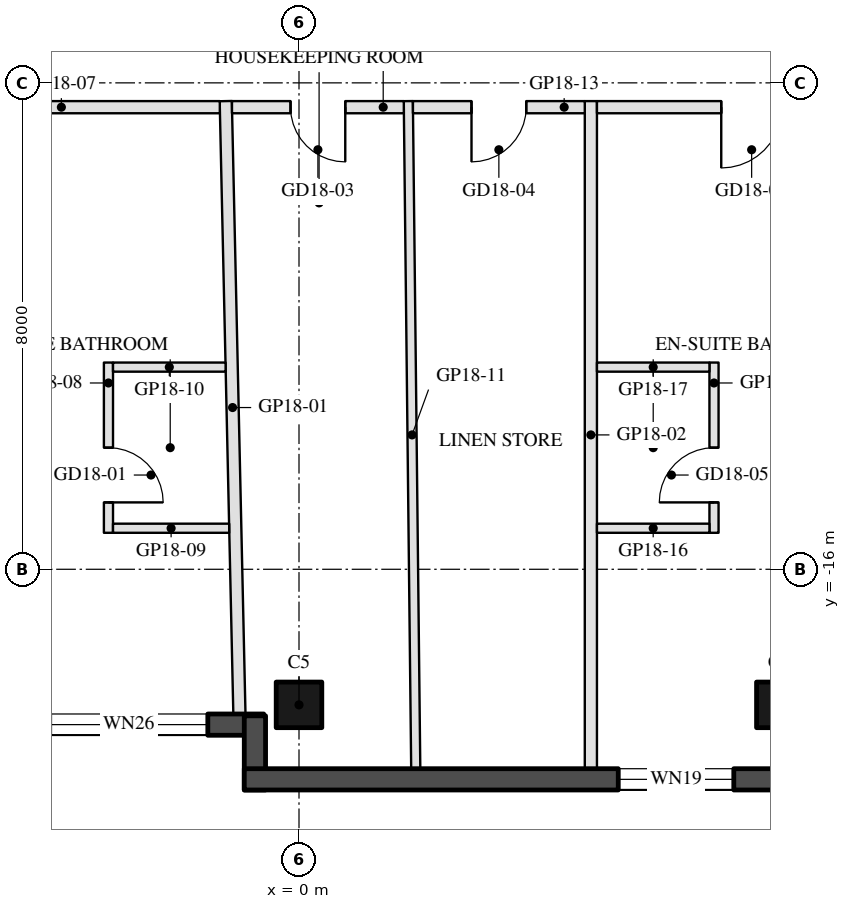
"""IFC4 building model, lengths in metres.
Left out: names, types, materials, properties, quantities, classifications, styles, units other than length and angle.
Written with IfcOpenShell. Run it as: python <this file> out.ifc"""

import sys

from ifc_helpers import new_model, si_unit, direction, frame, frame_2d, origin, origin_2d, place, context, subcontext, project, spatial, rectangle, hollow_rectangle, extrude, element, fill, save


model = new_model("IFC4")
c1 = context("Model", 3, precision=1e-05, world=origin(), true_north=direction((0.0, 1.0)))
c2 = subcontext(c1, "Body", "Model", "MODEL_VIEW")
j1 = project(units=[si_unit("LENGTHUNIT", "METRE"), si_unit("PLANEANGLEUNIT", "RADIAN")], contexts=[c1])
p1 = place(None, origin())
s1 = spatial("IfcSite", under=j1, at=p1, CompositionType="ELEMENT")
p2 = place(p1, origin())
s2 = spatial("IfcBuilding", under=s1, at=p2, CompositionType="ELEMENT")
p3 = place(p2, frame((0.0, 0.0, 194.7)))
s3 = spatial("IfcBuildingStorey", under=s2, at=p3, CompositionType="ELEMENT", Elevation=194.7)
for number, where, z_axis, x_axis in (
    (1, (0.0, -18.23, 0.0), (0.0, 0.0, 1.0), (-1.0, 0.0, 0.0)),
    (2, (7.9, -18.23, 0.0), (0.0, 0.0, 1.0), (-1.0, 0.0, 0.0)),
):
    element("IfcColumn", number, at=place(p3, frame(where, z_axis=z_axis, x_axis=x_axis)), inside=s3, PredefinedType="COLUMN", context=c2, shape_type="SweptSolid", body=[
        extrude(hollow_rectangle(XDim=0.75, YDim=0.75, WallThickness=0.035, at=origin_2d()), origin(), (0.0, 0.0, 1.0), 3.7),
    ])
p4 = place(p3, frame((-7.32, -18.555, 0.0), z_axis=(0.0, 0.0, 1.0), x_axis=(1.0, 0.0, 0.0)))
e3 = element("IfcWall", 3, at=p4, inside=s3, PredefinedType="SOLIDWALL", context=c2, shape_type="SweptSolid", body=[
    extrude(rectangle(XDim=6.74, YDim=0.35, at=frame_2d((3.37, 0.0))), origin(), (0.0, 0.0, 1.0), 3.55),
])
p5 = place(p4, frame((0.32, 0.0, 0.3)))
e4 = element("IfcOpeningElement", 4, at=p5, cuts=e3, PredefinedType="OPENING", context=c2, shape_type="SweptSolid", body=[
    extrude(rectangle(XDim=2.6, YDim=2.65, at=frame_2d((1.3, 1.325))), frame((0.0, 0.185, 0.0), z_axis=(0.0, -1.0, 0.0), x_axis=(1.0, 0.0, 0.0)), (0.0, 0.0, 1.0), 0.37),
])
p6 = place(p4, frame((3.22, 0.0, 0.3)))
e5 = element("IfcOpeningElement", 5, at=p6, cuts=e3, PredefinedType="OPENING", context=c2, shape_type="SweptSolid", body=[
    extrude(rectangle(XDim=2.6, YDim=2.65, at=frame_2d((1.3, 1.325))), frame((0.0, 0.185, 0.0), z_axis=(0.0, -1.0, 0.0), x_axis=(1.0, 0.0, 0.0)), (0.0, 0.0, 1.0), 0.37),
])
p7 = place(p3, frame((-0.725, -18.41, 0.0), z_axis=(0.0, 0.0, 1.0), x_axis=(0.0, -1.0, 0.0)))
e6 = element("IfcWall", 6, at=p7, inside=s3, PredefinedType="SOLIDWALL", context=c2, shape_type="SweptSolid", body=[
    extrude(rectangle(XDim=1.22, YDim=0.35, at=frame_2d((0.61, 0.0))), origin(), (0.0, 0.0, 1.0), 3.55),
])
p8 = place(p3, frame((-0.9, -19.455, 0.0), z_axis=(0.0, 0.0, 1.0), x_axis=(1.0, 0.0, 0.0)))
e7 = element("IfcWall", 7, at=p8, inside=s3, PredefinedType="SOLIDWALL", context=c2, shape_type="SweptSolid", body=[
    extrude(rectangle(XDim=9.7, YDim=0.35, at=frame_2d((4.85, 0.0))), origin(), (0.0, 0.0, 1.0), 3.55),
])
p9 = place(p8, frame((6.15, 0.0, 0.3)))
e8 = element("IfcOpeningElement", 8, at=p9, cuts=e7, PredefinedType="OPENING", context=c2, shape_type="SweptSolid", body=[
    extrude(rectangle(XDim=1.9, YDim=2.65, at=frame_2d((0.95, 1.325))), frame((0.0, 0.185, 0.0), z_axis=(0.0, -1.0, 0.0), x_axis=(1.0, 0.0, 0.0)), (0.0, 0.0, 1.0), 0.37),
])
p10 = place(p3, frame((-0.98, -18.38, 0.0), z_axis=(0.0, 0.0, 1.0), x_axis=(-0.022277513004, 0.999751825412, 0.0)))
e9 = element("IfcWall", 9, at=p10, inside=s3, PredefinedType="PARTITIONING", context=c2, shape_type="SweptSolid", body=[
    extrude(rectangle(XDim=10.082, YDim=0.2, at=frame_2d((5.041, 0.0))), origin(), (0.0, 0.0, 1.0), 3.06),
])
p11 = place(p3, frame((4.8, -19.28, 0.0), z_axis=(0.0, 0.0, 1.0), x_axis=(0.0, 1.0, 0.0)))
e10 = element("IfcWall", 10, at=p11, inside=s3, PredefinedType="PARTITIONING", context=c2, shape_type="SweptSolid", body=[
    extrude(rectangle(XDim=10.98, YDim=0.2, at=frame_2d((5.49, 0.0))), origin(), (0.0, 0.0, 1.0), 3.06),
])
p12 = place(p3, frame((-1.302, -8.4, 0.0), z_axis=(0.0, 0.0, 1.0), x_axis=(-1.0, 0.0, 0.0)))
e11 = element("IfcWall", 11, at=p12, inside=s3, PredefinedType="PARTITIONING", context=c2, shape_type="SweptSolid", body=[
    extrude(rectangle(XDim=8.686, YDim=0.2, at=frame_2d((4.343, 0.0))), origin(), (0.0, 0.0, 1.0), 2.95),
])
p13 = place(p12, frame((3.843, 0.0, 0.0)))
e12 = element("IfcOpeningElement", 12, at=p13, cuts=e11, PredefinedType="OPENING", context=c2, shape_type="SweptSolid", body=[
    extrude(rectangle(XDim=1.0, YDim=2.1, at=frame_2d((0.5, 1.05))), frame((0.0, 0.11, 0.0), z_axis=(0.0, -1.0, 0.0), x_axis=(1.0, 0.0, 0.0)), (0.0, 0.0, 1.0), 0.22),
])
p14 = place(p3, frame((-3.134, -12.6, 0.0), z_axis=(0.0, 0.0, 1.0), x_axis=(0.0, -1.0, 0.0)))
e13 = element("IfcWall", 13, at=p14, inside=s3, PredefinedType="PARTITIONING", context=c2, shape_type="SweptSolid", body=[
    extrude(rectangle(XDim=2.8, YDim=0.15, at=frame_2d((1.4, 0.0))), origin(), (0.0, 0.0, 1.0), 3.55),
])
p15 = place(p14, frame((1.4, 0.0, 0.0)))
e14 = element("IfcOpeningElement", 14, at=p15, cuts=e13, PredefinedType="OPENING", context=c2, shape_type="SweptSolid", body=[
    extrude(rectangle(XDim=0.9, YDim=2.1, at=frame_2d((0.45, 1.05))), frame((0.0, 0.085, 0.0), z_axis=(0.0, -1.0, 0.0), x_axis=(1.0, 0.0, 0.0)), (0.0, 0.0, 1.0), 0.17),
])
p16 = place(p3, frame((-3.059, -15.325, 0.0), z_axis=(0.0, 0.0, 1.0), x_axis=(1.0, 0.0, 0.0)))
e15 = element("IfcWall", 15, at=p16, inside=s3, PredefinedType="PARTITIONING", context=c2, shape_type="SweptSolid", body=[
    extrude(rectangle(XDim=1.91, YDim=0.15, at=frame_2d((0.955, 0.0))), origin(), (0.0, 0.0, 1.0), 3.55),
])
p17 = place(p3, frame((-3.059, -12.675, 0.0), z_axis=(0.0, 0.0, 1.0), x_axis=(1.0, 0.0, 0.0)))
e16 = element("IfcWall", 16, at=p17, inside=s3, PredefinedType="PARTITIONING", context=c2, shape_type="SweptSolid", body=[
    extrude(rectangle(XDim=1.852, YDim=0.15, at=frame_2d((0.926, 0.0))), origin(), (0.0, 0.0, 1.0), 3.55),
])
p18 = place(p3, frame((1.92, -19.28, 0.0), z_axis=(0.0, 0.0, 1.0), x_axis=(-0.011116847578, 0.999938205941, 0.0)))
e17 = element("IfcWall", 17, at=p18, inside=s3, PredefinedType="PARTITIONING", context=c2, shape_type="SweptSolid", body=[
    extrude(rectangle(XDim=10.981, YDim=0.15, at=frame_2d((5.49, 0.0))), origin(), (0.0, 0.0, 1.0), 3.06),
])
p19 = place(p3, frame((1.724, -8.4, 0.0), z_axis=(0.0, 0.0, 1.0), x_axis=(-1.0, 0.0, 0.0)))
e18 = element("IfcWall", 18, at=p19, inside=s3, PredefinedType="PARTITIONING", context=c2, shape_type="SweptSolid", body=[
    extrude(rectangle(XDim=2.826, YDim=0.2, at=frame_2d((1.413, 0.0))), origin(), (0.0, 0.0, 1.0), 2.95),
])
p20 = place(p19, frame((0.963, 0.0, 0.0)))
e19 = element("IfcOpeningElement", 19, at=p20, cuts=e18, PredefinedType="OPENING", context=c2, shape_type="SweptSolid", body=[
    extrude(rectangle(XDim=0.9, YDim=2.1, at=frame_2d((0.45, 1.05))), frame((0.0, 0.11, 0.0), z_axis=(0.0, -1.0, 0.0), x_axis=(1.0, 0.0, 0.0)), (0.0, 0.0, 1.0), 0.22),
])
p21 = place(p3, frame((4.7, -8.4, 0.0), z_axis=(0.0, 0.0, 1.0), x_axis=(-1.0, 0.0, 0.0)))
e20 = element("IfcWall", 20, at=p21, inside=s3, PredefinedType="PARTITIONING", context=c2, shape_type="SweptSolid", body=[
    extrude(rectangle(XDim=2.826, YDim=0.2, at=frame_2d((1.413, 0.0))), origin(), (0.0, 0.0, 1.0), 2.95),
])
p22 = place(p21, frame((0.963, 0.0, 0.0)))
e21 = element("IfcOpeningElement", 21, at=p22, cuts=e20, PredefinedType="OPENING", context=c2, shape_type="SweptSolid", body=[
    extrude(rectangle(XDim=0.9, YDim=2.1, at=frame_2d((0.45, 1.05))), frame((0.0, 0.11, 0.0), z_axis=(0.0, -1.0, 0.0), x_axis=(1.0, 0.0, 0.0)), (0.0, 0.0, 1.0), 0.22),
])
p23 = place(p3, frame((9.988, -8.4, 0.0), z_axis=(0.0, 0.0, 1.0), x_axis=(-1.0, 0.0, 0.0)))
e22 = element("IfcWall", 22, at=p23, inside=s3, PredefinedType="PARTITIONING", context=c2, shape_type="SweptSolid", body=[
    extrude(rectangle(XDim=5.088, YDim=0.2, at=frame_2d((2.544, 0.0))), origin(), (0.0, 0.0, 1.0), 2.95),
])
p24 = place(p23, frame((2.044, 0.0, 0.0)))
e23 = element("IfcOpeningElement", 23, at=p24, cuts=e22, PredefinedType="OPENING", context=c2, shape_type="SweptSolid", body=[
    extrude(rectangle(XDim=1.0, YDim=2.1, at=frame_2d((0.5, 1.05))), frame((0.0, 0.11, 0.0), z_axis=(0.0, -1.0, 0.0), x_axis=(1.0, 0.0, 0.0)), (0.0, 0.0, 1.0), 0.22),
])
p25 = place(p3, frame((6.825, -15.4, 0.0), z_axis=(0.0, 0.0, 1.0), x_axis=(0.0, 1.0, 0.0)))
e24 = element("IfcWall", 24, at=p25, inside=s3, PredefinedType="PARTITIONING", context=c2, shape_type="SweptSolid", body=[
    extrude(rectangle(XDim=2.8, YDim=0.15, at=frame_2d((1.4, 0.0))), origin(), (0.0, 0.0, 1.0), 3.55),
])
p26 = place(p25, frame((0.5, 0.0, 0.0)))
e25 = element("IfcOpeningElement", 25, at=p26, cuts=e24, PredefinedType="OPENING", context=c2, shape_type="SweptSolid", body=[
    extrude(rectangle(XDim=0.9, YDim=2.1, at=frame_2d((0.45, 1.05))), frame((0.0, 0.085, 0.0), z_axis=(0.0, -1.0, 0.0), x_axis=(1.0, 0.0, 0.0)), (0.0, 0.0, 1.0), 0.17),
])
for number, where, z_axis, x_axis in (
    (26, (4.9, -15.325, 0.0), (0.0, 0.0, 1.0), (1.0, 0.0, 0.0)),
    (27, (4.9, -12.675, 0.0), (0.0, 0.0, 1.0), (1.0, 0.0, 0.0)),
):
    element("IfcWall", number, at=place(p3, frame(where, z_axis=z_axis, x_axis=x_axis)), inside=s3, PredefinedType="PARTITIONING", context=c2, shape_type="SweptSolid", body=[
        extrude(rectangle(XDim=1.85, YDim=0.15, at=frame_2d((0.925, 0.0))), origin(), (0.0, 0.0, 1.0), 3.55),
    ])
p27 = place(p6, origin())
e28 = element("IfcWindow", 28, at=p27, inside=s3, PartitioningType="SINGLE_PANEL", PredefinedType="WINDOW", context=c2, shape_type="SweptSolid", body=[
    extrude(rectangle(XDim=2.6, YDim=2.65, at=frame_2d((1.3, 1.325))), frame((0.0, 0.03, 0.0), z_axis=(0.0, -1.0, 0.0), x_axis=(1.0, 0.0, 0.0)), (0.0, 0.0, 1.0), 0.06),
])
fill(e5, e28)
p28 = place(p9, origin())
e29 = element("IfcWindow", 29, at=p28, inside=s3, PartitioningType="SINGLE_PANEL", PredefinedType="WINDOW", context=c2, shape_type="SweptSolid", body=[
    extrude(rectangle(XDim=1.9, YDim=2.65, at=frame_2d((0.95, 1.325))), frame((0.0, 0.03, 0.0), z_axis=(0.0, -1.0, 0.0), x_axis=(1.0, 0.0, 0.0)), (0.0, 0.0, 1.0), 0.06),
])
fill(e8, e29)
p29 = place(p15, origin())
e30 = element("IfcDoor", 30, at=p29, inside=s3, OperationType="SINGLE_SWING_RIGHT", PredefinedType="DOOR", context=c2, shape_type="SweptSolid", body=[
    extrude(rectangle(XDim=0.9, YDim=2.1, at=frame_2d((0.45, 1.05))), frame((0.0, 0.025, 0.0), z_axis=(0.0, -1.0, 0.0), x_axis=(1.0, 0.0, 0.0)), (0.0, 0.0, 1.0), 0.05),
])
fill(e14, e30)
p30 = place(p20, origin())
e31 = element("IfcDoor", 31, at=p30, inside=s3, OperationType="SINGLE_SWING_LEFT", PredefinedType="DOOR", context=c2, shape_type="SweptSolid", body=[
    extrude(rectangle(XDim=0.9, YDim=2.1, at=frame_2d((0.45, 1.05))), frame((0.0, 0.025, 0.0), z_axis=(0.0, -1.0, 0.0), x_axis=(1.0, 0.0, 0.0)), (0.0, 0.0, 1.0), 0.05),
])
fill(e19, e31)
p31 = place(p22, origin())
e32 = element("IfcDoor", 32, at=p31, inside=s3, OperationType="SINGLE_SWING_RIGHT", PredefinedType="DOOR", context=c2, shape_type="SweptSolid", body=[
    extrude(rectangle(XDim=0.9, YDim=2.1, at=frame_2d((0.45, 1.05))), frame((0.0, 0.025, 0.0), z_axis=(0.0, -1.0, 0.0), x_axis=(1.0, 0.0, 0.0)), (0.0, 0.0, 1.0), 0.05),
])
fill(e21, e32)
p32 = place(p26, origin())
e33 = element("IfcDoor", 33, at=p32, inside=s3, OperationType="SINGLE_SWING_LEFT", PredefinedType="DOOR", context=c2, shape_type="SweptSolid", body=[
    extrude(rectangle(XDim=0.9, YDim=2.1, at=frame_2d((0.45, 1.05))), frame((0.0, 0.025, 0.0), z_axis=(0.0, -1.0, 0.0), x_axis=(1.0, 0.0, 0.0)), (0.0, 0.0, 1.0), 0.05),
])
fill(e25, e33)
p33 = place(p24, origin())
e34 = element("IfcDoor", 34, at=p33, inside=s3, OperationType="SINGLE_SWING_RIGHT", PredefinedType="DOOR", context=c2, shape_type="SweptSolid", body=[
    extrude(rectangle(XDim=1.0, YDim=2.1, at=frame_2d((0.5, 1.05))), frame((0.0, 0.025, 0.0), z_axis=(0.0, -1.0, 0.0), x_axis=(1.0, 0.0, 0.0)), (0.0, 0.0, 1.0), 0.05),
])
fill(e23, e34)
save(model, sys.argv[1])
